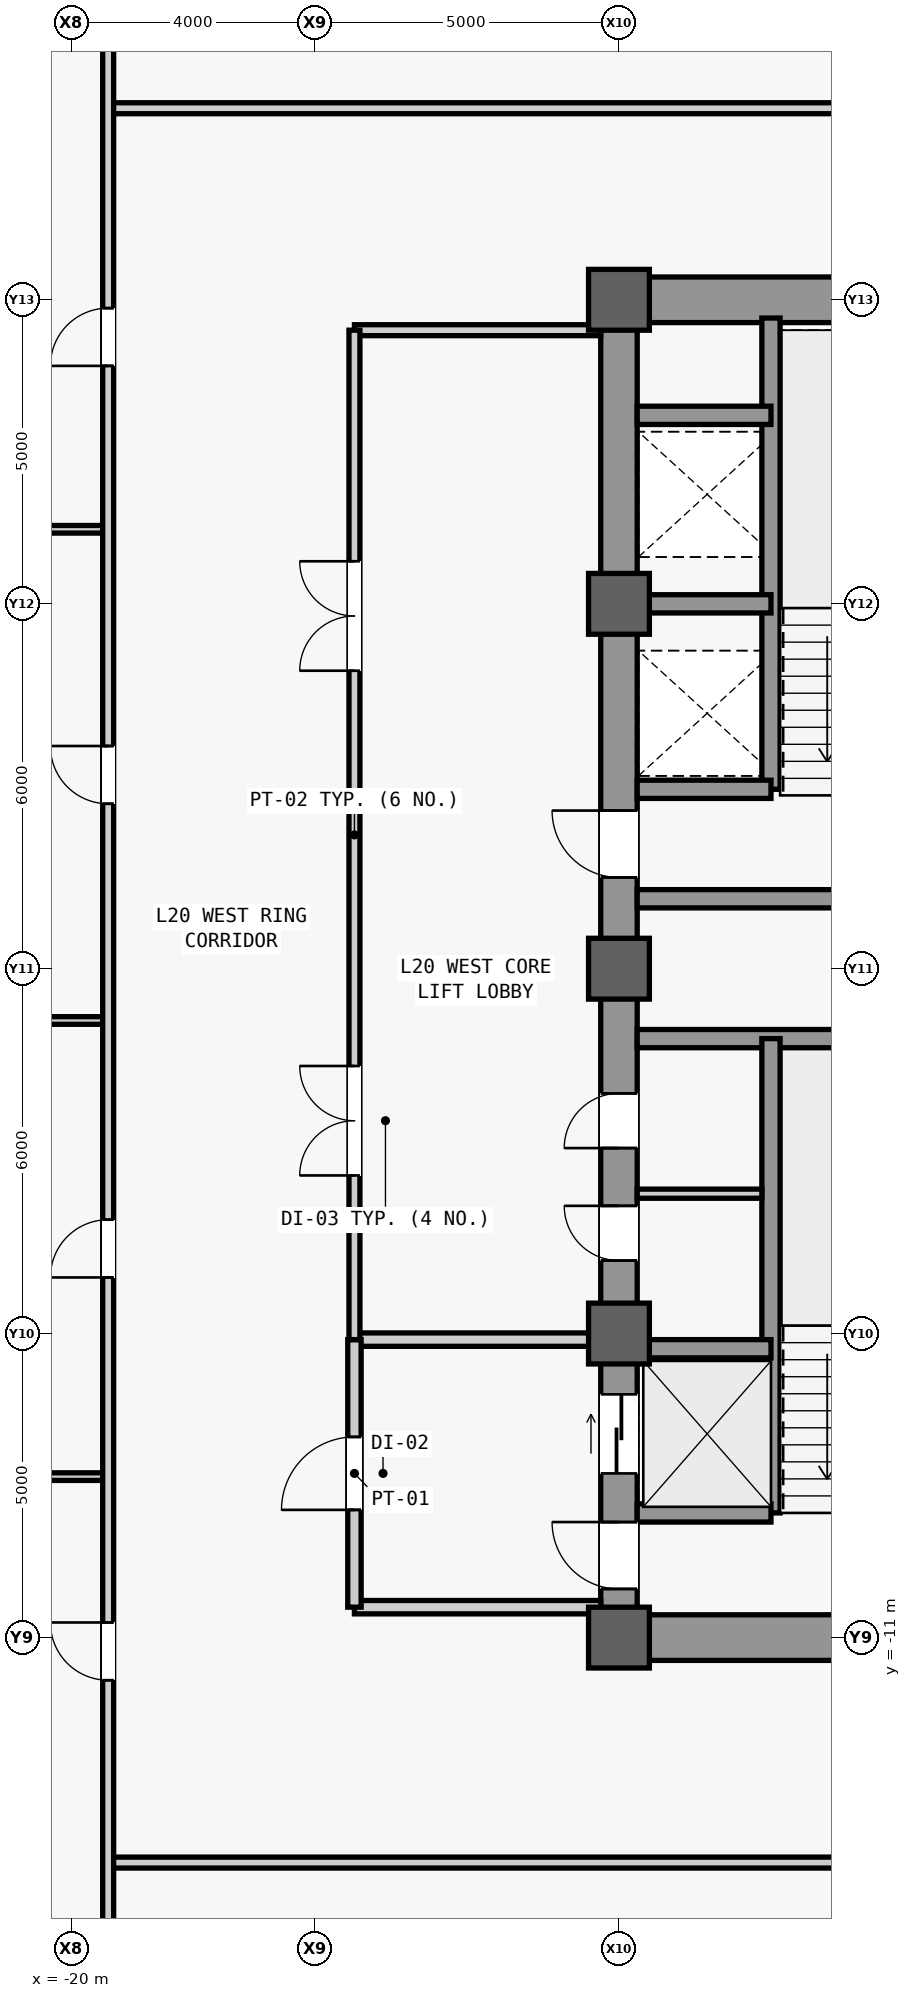
"""IFC4 building model, lengths in metres.
Left out: names, types, materials, properties, quantities, classifications, styles, units other than length and angle.
Written with IfcOpenShell. Run it as: python <this file> out.ifc"""

import sys

from ifc_helpers import new_model, si_unit, direction, frame, frame_2d, origin, origin_2d, place, context, subcontext, project, spatial, rectangle, extrude, source, transform, mapped, element, fill, save


model = new_model("IFC4")
c1 = context("Model", 3, precision=1e-05, world=origin(), true_north=direction((0.0, 1.0)))
c2 = subcontext(c1, "Body", "Model", "MODEL_VIEW")
j1 = project(units=[si_unit("LENGTHUNIT", "METRE"), si_unit("PLANEANGLEUNIT", "RADIAN")], contexts=[c1])
p1 = place(None, origin())
s1 = spatial("IfcSite", under=j1, at=p1, CompositionType="ELEMENT")
p2 = place(p1, origin())
s2 = spatial("IfcBuilding", under=s1, at=p2, CompositionType="ELEMENT")
p3 = place(p2, frame((0.0, 0.0, 91.4)))
s3 = spatial("IfcBuildingStorey", under=s2, at=p3, CompositionType="ELEMENT", Elevation=91.4)
m1 = source(origin(), c2, "Body", "SweptSolid", [
    extrude(rectangle(XDim=22.0, YDim=0.6, at=frame_2d((11.0, 0.0))), origin(), (0.0, 0.0, 1.0), 3.84),
])
p4 = place(p3, frame((-11.0, -11.0, 0.0), z_axis=(0.0, 0.0, 1.0), x_axis=(0.0, 1.0, 0.0)))
e1 = element("IfcWall", 1, at=p4, inside=s3, PredefinedType="SHEAR", context=c2, shape_type="MappedRepresentation", body=[
    mapped(m1, transform((0.0, 0.0, 0.0), scale=1.0)),
])
m2 = source(origin(), c2, "Body", "SweptSolid", [
    extrude(rectangle(XDim=1.1, YDim=2.2, at=frame_2d((0.55, 1.1))), frame((0.0, 0.31, 0.0), z_axis=(0.0, -1.0, 0.0), x_axis=(1.0, 0.0, 0.0)), (0.0, 0.0, 1.0), 0.62),
])
p5 = place(p4, frame((0.8, 0.0, 0.0)))
e2 = element("IfcOpeningElement", 2, at=p5, cuts=e1, PredefinedType="OPENING", context=c2, shape_type="MappedRepresentation", body=[
    mapped(m2, transform((0.0, 0.0, 0.0), scale=1.0)),
])
p6 = place(p4, frame((12.5, 0.0, 0.0)))
e3 = element("IfcOpeningElement", 3, at=p6, cuts=e1, PredefinedType="OPENING", context=c2, shape_type="MappedRepresentation", body=[
    mapped(m2, transform((0.0, 0.0, 0.0), scale=1.0)),
])
m3 = source(origin(), c2, "Body", "SweptSolid", [
    extrude(rectangle(XDim=0.9, YDim=2.15, at=frame_2d((0.45, 1.075))), frame((0.0, 0.31, 0.0), z_axis=(0.0, -1.0, 0.0), x_axis=(1.0, 0.0, 0.0)), (0.0, 0.0, 1.0), 0.62),
])
p7 = place(p4, frame((6.2, 0.0, 0.0)))
e4 = element("IfcOpeningElement", 4, at=p7, cuts=e1, PredefinedType="OPENING", context=c2, shape_type="MappedRepresentation", body=[
    mapped(m3, transform((0.0, 0.0, 0.0), scale=1.0)),
])
p8 = place(p4, frame((8.05, 0.0, 0.0)))
e5 = element("IfcOpeningElement", 5, at=p8, cuts=e1, PredefinedType="OPENING", context=c2, shape_type="MappedRepresentation", body=[
    mapped(m3, transform((0.0, 0.0, 0.0), scale=1.0)),
])
m4 = source(origin(), c2, "Body", "SweptSolid", [
    extrude(rectangle(XDim=1.3, YDim=2.3, at=frame_2d((0.65, 1.15))), frame((0.0, 0.31, 0.0), z_axis=(0.0, -1.0, 0.0), x_axis=(1.0, 0.0, 0.0)), (0.0, 0.0, 1.0), 0.62),
])
p9 = place(p4, frame((2.7, 0.0, 0.0)))
e6 = element("IfcOpeningElement", 6, at=p9, cuts=e1, PredefinedType="OPENING", context=c2, shape_type="MappedRepresentation", body=[
    mapped(m4, transform((0.0, 0.0, 0.0), scale=1.0)),
])
m5 = source(origin(), c2, "Body", "SweptSolid", [
    extrude(rectangle(XDim=5.85, YDim=0.75, at=frame_2d((2.925, 0.0))), origin(), (0.0, 0.0, 1.0), 3.84),
])
for number, where, z_axis, x_axis in (
    (7, (-10.7, -11.0, 0.0), (0.0, 0.0, 1.0), (1.0, 0.0, 0.0)),
    (8, (-10.7, 11.0, 0.0), (0.0, 0.0, 1.0), (1.0, 0.0, 0.0)),
):
    element("IfcWall", number, at=place(p3, frame(where, z_axis=z_axis, x_axis=x_axis)), inside=s3, PredefinedType="SHEAR", context=c2, shape_type="MappedRepresentation", body=[
        mapped(m5, transform((0.0, 0.0, 0.0), scale=1.0)),
    ])
m6 = source(origin(), c2, "Body", "SweptSolid", [
    extrude(rectangle(XDim=5.6, YDim=0.3, at=frame_2d((2.8, 0.0))), origin(), (0.0, 0.0, 1.0), 3.84),
])
for number, where, z_axis, x_axis in (
    (9, (-10.7, -1.15, 0.0), (0.0, 0.0, 1.0), (1.0, 0.0, 0.0)),
    (10, (-10.7, 1.15, 0.0), (0.0, 0.0, 1.0), (1.0, 0.0, 0.0)),
):
    element("IfcWall", number, at=place(p3, frame(where, z_axis=z_axis, x_axis=x_axis)), inside=s3, PredefinedType="SHEAR", context=c2, shape_type="MappedRepresentation", body=[
        mapped(m6, transform((0.0, 0.0, 0.0), scale=1.0)),
    ])
m7 = source(origin(), c2, "Body", "SweptSolid", [
    extrude(rectangle(XDim=1.0, YDim=1.0, at=origin_2d()), origin(), (0.0, 0.0, 1.0), 4.1),
])
for number, where, z_axis, x_axis in (
    (11, (-11.0, -11.0, 0.0), (0.0, 0.0, 1.0), (1.0, 0.0, 0.0)),
    (12, (-11.0, -6.0, 0.0), (0.0, 0.0, 1.0), (1.0, 0.0, 0.0)),
    (13, (-11.0, 0.0, 0.0), (0.0, 0.0, 1.0), (1.0, 0.0, 0.0)),
    (14, (-11.0, 6.0, 0.0), (0.0, 0.0, 1.0), (1.0, 0.0, 0.0)),
    (15, (-11.0, 11.0, 0.0), (0.0, 0.0, 1.0), (1.0, 0.0, 0.0)),
):
    element("IfcColumn", number, at=place(p3, frame(where, z_axis=z_axis, x_axis=x_axis)), inside=s3, PredefinedType="COLUMN", context=c2, shape_type="MappedRepresentation", body=[
        mapped(m7, transform((0.0, 0.0, 0.0), scale=1.0)),
    ])
m8 = source(origin(), c2, "Body", "SweptSolid", [
    extrude(rectangle(XDim=7.8, YDim=0.3, at=frame_2d((3.9, 0.0))), origin(), (0.0, 0.0, 1.0), 3.84),
])
p10 = place(p3, frame((-8.5, -8.95, 0.0), z_axis=(0.0, 0.0, 1.0), x_axis=(0.0, 1.0, 0.0)))
e16 = element("IfcWall", 16, at=p10, inside=s3, PredefinedType="SHEAR", context=c2, shape_type="MappedRepresentation", body=[
    mapped(m8, transform((0.0, 0.0, 0.0), scale=1.0)),
])
m9 = source(origin(), c2, "Body", "SweptSolid", [
    extrude(rectangle(XDim=2.2, YDim=0.3, at=frame_2d((1.1, 0.0))), origin(), (0.0, 0.0, 1.0), 3.84),
])
for number, where, z_axis, x_axis in (
    (17, (-10.7, -8.95, 0.0), (0.0, 0.0, 1.0), (1.0, 0.0, 0.0)),
    (18, (-10.7, -6.25, 0.0), (0.0, 0.0, 1.0), (1.0, 0.0, 0.0)),
):
    element("IfcWall", number, at=place(p3, frame(where, z_axis=z_axis, x_axis=x_axis)), inside=s3, PredefinedType="SHEAR", context=c2, shape_type="MappedRepresentation", body=[
        mapped(m9, transform((0.0, 0.0, 0.0), scale=1.0)),
    ])
m10 = source(origin(), c2, "Body", "SweptSolid", [
    extrude(rectangle(XDim=7.75, YDim=0.3, at=frame_2d((3.875, 0.0))), origin(), (0.0, 0.0, 1.0), 3.84),
])
p11 = place(p3, frame((-8.5, 2.95, 0.0), z_axis=(0.0, 0.0, 1.0), x_axis=(0.0, 1.0, 0.0)))
e19 = element("IfcWall", 19, at=p11, inside=s3, PredefinedType="SHEAR", context=c2, shape_type="MappedRepresentation", body=[
    mapped(m10, transform((0.0, 0.0, 0.0), scale=1.0)),
])
for number, where, z_axis, x_axis in (
    (20, (-10.7, 2.95, 0.0), (0.0, 0.0, 1.0), (1.0, 0.0, 0.0)),
    (21, (-10.7, 6.0, 0.0), (0.0, 0.0, 1.0), (1.0, 0.0, 0.0)),
    (22, (-10.7, 9.1, 0.0), (0.0, 0.0, 1.0), (1.0, 0.0, 0.0)),
):
    element("IfcWall", number, at=place(p3, frame(where, z_axis=z_axis, x_axis=x_axis)), inside=s3, PredefinedType="SHEAR", context=c2, shape_type="MappedRepresentation", body=[
        mapped(m9, transform((0.0, 0.0, 0.0), scale=1.0)),
    ])
m11 = source(origin(), c2, "Body", "SweptSolid", [
    extrude(rectangle(XDim=2.05, YDim=0.15, at=frame_2d((1.025, 0.0))), origin(), (0.0, 0.0, 1.0), 3.84),
])
p12 = place(p3, frame((-10.7, -3.7, 0.0), z_axis=(0.0, 0.0, 1.0), x_axis=(1.0, 0.0, 0.0)))
e23 = element("IfcWall", 23, at=p12, inside=s3, PredefinedType="PARTITIONING", context=c2, shape_type="MappedRepresentation", body=[
    mapped(m11, transform((0.0, 0.0, 0.0), scale=1.0)),
])
m12 = source(origin(), c2, "Body", "SweptSolid", [
    extrude(rectangle(XDim=4.05, YDim=0.22, at=frame_2d((2.025, 0.0))), origin(), (0.0, 0.0, 1.0), 3.84),
])
p13 = place(p3, frame((-15.35, -10.5, 0.0), z_axis=(0.0, 0.0, 1.0), x_axis=(1.0, 0.0, 0.0)))
e24 = element("IfcWall", 24, at=p13, inside=s3, PredefinedType="PARTITIONING", context=c2, shape_type="MappedRepresentation", body=[
    mapped(m12, transform((0.0, 0.0, 0.0), scale=1.0)),
])
m13 = source(origin(), c2, "Body", "SweptSolid", [
    extrude(rectangle(XDim=4.05, YDim=0.22, at=frame_2d((2.025, 0.0))), origin(), (0.0, 0.0, 1.0), 3.067),
])
p14 = place(p3, frame((-15.35, -6.1, 0.0), z_axis=(0.0, 0.0, 1.0), x_axis=(1.0, 0.0, 0.0)))
e25 = element("IfcWall", 25, at=p14, inside=s3, PredefinedType="PARTITIONING", context=c2, shape_type="MappedRepresentation", body=[
    mapped(m13, transform((0.0, 0.0, 0.0), scale=1.0)),
])
m14 = source(origin(), c2, "Body", "SweptSolid", [
    extrude(rectangle(XDim=4.4, YDim=0.22, at=frame_2d((2.2, 0.0))), origin(), (0.0, 0.0, 1.0), 3.84),
])
p15 = place(p3, frame((-15.35, -10.5, 0.0), z_axis=(0.0, 0.0, 1.0), x_axis=(0.0, 1.0, 0.0)))
e26 = element("IfcWall", 26, at=p15, inside=s3, PredefinedType="PARTITIONING", context=c2, shape_type="MappedRepresentation", body=[
    mapped(m14, transform((0.0, 0.0, 0.0), scale=1.0)),
])
m15 = source(origin(), c2, "Body", "SweptSolid", [
    extrude(rectangle(XDim=1.2, YDim=2.2, at=frame_2d((0.6, 1.1))), frame((0.0, 0.12, 0.0), z_axis=(0.0, -1.0, 0.0), x_axis=(1.0, 0.0, 0.0)), (0.0, 0.0, 1.0), 0.24),
])
p16 = place(p15, frame((1.6, 0.0, 0.0)))
e27 = element("IfcOpeningElement", 27, at=p16, cuts=e26, PredefinedType="OPENING", context=c2, shape_type="MappedRepresentation", body=[
    mapped(m15, transform((0.0, 0.0, 0.0), scale=1.0)),
])
m16 = source(origin(), c2, "Body", "SweptSolid", [
    extrude(rectangle(XDim=4.05, YDim=0.18, at=frame_2d((2.025, 0.0))), origin(), (0.0, 0.0, 1.0), 3.84),
])
p17 = place(p3, frame((-15.35, 10.5, 0.0), z_axis=(0.0, 0.0, 1.0), x_axis=(1.0, 0.0, 0.0)))
e28 = element("IfcWall", 28, at=p17, inside=s3, PredefinedType="PARTITIONING", context=c2, shape_type="MappedRepresentation", body=[
    mapped(m16, transform((0.0, 0.0, 0.0), scale=1.0)),
])
m17 = source(origin(), c2, "Body", "SweptSolid", [
    extrude(rectangle(XDim=16.6, YDim=0.18, at=frame_2d((8.3, 0.0))), origin(), (0.0, 0.0, 1.0), 3.84),
])
p18 = place(p3, frame((-15.35, -6.1, 0.0), z_axis=(0.0, 0.0, 1.0), x_axis=(0.0, 1.0, 0.0)))
e29 = element("IfcWall", 29, at=p18, inside=s3, PredefinedType="PARTITIONING", context=c2, shape_type="MappedRepresentation", body=[
    mapped(m17, transform((0.0, 0.0, 0.0), scale=1.0)),
])
m18 = source(origin(), c2, "Body", "SweptSolid", [
    extrude(rectangle(XDim=1.8, YDim=2.25, at=frame_2d((0.9, 1.125))), frame((0.0, 0.1, 0.0), z_axis=(0.0, -1.0, 0.0), x_axis=(1.0, 0.0, 0.0)), (0.0, 0.0, 1.0), 0.2),
])
p19 = place(p18, frame((2.7, 0.0, 0.0)))
e30 = element("IfcOpeningElement", 30, at=p19, cuts=e29, PredefinedType="OPENING", context=c2, shape_type="MappedRepresentation", body=[
    mapped(m18, transform((0.0, 0.0, 0.0), scale=1.0)),
])
p20 = place(p18, frame((11.0, 0.0, 0.0)))
e31 = element("IfcOpeningElement", 31, at=p20, cuts=e29, PredefinedType="OPENING", context=c2, shape_type="MappedRepresentation", body=[
    mapped(m18, transform((0.0, 0.0, 0.0), scale=1.0)),
])
m19 = source(origin(), c2, "Body", "SweptSolid", [
    extrude(rectangle(XDim=37.1, YDim=0.18, at=frame_2d((18.55, 0.0))), origin(), (0.0, 0.0, 1.0), 3.84),
])
p21 = place(p3, frame((-19.4, -14.7, 0.0), z_axis=(0.0, 0.0, 1.0), x_axis=(1.0, 0.0, 0.0)))
e32 = element("IfcWall", 32, at=p21, inside=s3, PredefinedType="PARTITIONING", context=c2, shape_type="MappedRepresentation", body=[
    mapped(m19, transform((0.0, 0.0, 0.0), scale=1.0)),
])
m20 = source(origin(), c2, "Body", "SweptSolid", [
    extrude(rectangle(XDim=1.05, YDim=2.2, at=frame_2d((0.525, 1.1))), frame((0.0, 0.1, 0.0), z_axis=(0.0, -1.0, 0.0), x_axis=(1.0, 0.0, 0.0)), (0.0, 0.0, 1.0), 0.2),
])
p22 = place(p21, frame((18.875, 0.0, 0.0)))
e33 = element("IfcOpeningElement", 33, at=p22, cuts=e32, PredefinedType="OPENING", context=c2, shape_type="MappedRepresentation", body=[
    mapped(m20, transform((0.0, 0.0, 0.0), scale=1.0)),
])
p23 = place(p3, frame((-19.4, 14.15, 0.0), z_axis=(0.0, 0.0, 1.0), x_axis=(1.0, 0.0, 0.0)))
e34 = element("IfcWall", 34, at=p23, inside=s3, PredefinedType="PARTITIONING", context=c2, shape_type="MappedRepresentation", body=[
    mapped(m19, transform((0.0, 0.0, 0.0), scale=1.0)),
])
p24 = place(p23, frame((18.875, 0.0, 0.0)))
e35 = element("IfcOpeningElement", 35, at=p24, cuts=e34, PredefinedType="OPENING", context=c2, shape_type="MappedRepresentation", body=[
    mapped(m20, transform((0.0, 0.0, 0.0), scale=1.0)),
])
m21 = source(origin(), c2, "Body", "SweptSolid", [
    extrude(rectangle(XDim=12.6, YDim=0.125, at=frame_2d((6.3, 0.0))), origin(), (0.0, 0.0, 1.0), 3.84),
])
for number, where, z_axis, x_axis in (
    (36, (-32.0, -8.353, 0.0), (0.0, 0.0, 1.0), (1.0, 0.0, 0.0)),
    (37, (-32.0, -0.852, 0.0), (0.0, 0.0, 1.0), (1.0, 0.0, 0.0)),
    (38, (-32.0, 7.226, 0.0), (0.0, 0.0, 1.0), (1.0, 0.0, 0.0)),
):
    element("IfcWall", number, at=place(p3, frame(where, z_axis=z_axis, x_axis=x_axis)), inside=s3, PredefinedType="PARTITIONING", context=c2, shape_type="MappedRepresentation", body=[
        mapped(m21, transform((0.0, 0.0, 0.0), scale=1.0)),
    ])
m22 = source(origin(), c2, "Body", "SweptSolid", [
    extrude(rectangle(XDim=56.0, YDim=0.18, at=frame_2d((28.0, 0.0))), origin(), (0.0, 0.0, 1.0), 3.371),
])
p25 = place(p3, frame((-19.4, -28.0, 0.0), z_axis=(0.0, 0.0, 1.0), x_axis=(0.0, 1.0, 0.0)))
e39 = element("IfcWall", 39, at=p25, inside=s3, PredefinedType="PARTITIONING", context=c2, shape_type="MappedRepresentation", body=[
    mapped(m22, transform((0.0, 0.0, 0.0), scale=1.0)),
])
m23 = source(origin(), c2, "Body", "SweptSolid", [
    extrude(rectangle(XDim=0.95, YDim=2.15, at=frame_2d((0.475, 1.075))), frame((0.0, 0.1, 0.0), z_axis=(0.0, -1.0, 0.0), x_axis=(1.0, 0.0, 0.0)), (0.0, 0.0, 1.0), 0.2),
])
p26 = place(p25, frame((16.299, 0.0, 0.0)))
e40 = element("IfcOpeningElement", 40, at=p26, cuts=e39, PredefinedType="OPENING", context=c2, shape_type="MappedRepresentation", body=[
    mapped(m23, transform((0.0, 0.0, 0.0), scale=1.0)),
])
p27 = place(p25, frame((22.923, 0.0, 0.0)))
e41 = element("IfcOpeningElement", 41, at=p27, cuts=e39, PredefinedType="OPENING", context=c2, shape_type="MappedRepresentation", body=[
    mapped(m23, transform((0.0, 0.0, 0.0), scale=1.0)),
])
p28 = place(p25, frame((30.712, 0.0, 0.0)))
e42 = element("IfcOpeningElement", 42, at=p28, cuts=e39, PredefinedType="OPENING", context=c2, shape_type="MappedRepresentation", body=[
    mapped(m23, transform((0.0, 0.0, 0.0), scale=1.0)),
])
p29 = place(p25, frame((37.913, 0.0, 0.0)))
e43 = element("IfcOpeningElement", 43, at=p29, cuts=e39, PredefinedType="OPENING", context=c2, shape_type="MappedRepresentation", body=[
    mapped(m23, transform((0.0, 0.0, 0.0), scale=1.0)),
])
m24 = source(origin(), c2, "Body", "SweptSolid", [
    extrude(rectangle(XDim=1.1, YDim=2.2, at=frame_2d((0.55, 1.1))), frame((0.0, 0.025, 0.0), z_axis=(0.0, -1.0, 0.0), x_axis=(1.0, 0.0, 0.0)), (0.0, 0.0, 1.0), 0.05),
])
p30 = place(p5, origin())
e44 = element("IfcDoor", 44, at=p30, inside=s3, OperationType="SINGLE_SWING_RIGHT", PredefinedType="DOOR", context=c2, shape_type="MappedRepresentation", body=[
    mapped(m24, transform((0.0, 0.0, 0.0), scale=1.0)),
])
fill(e2, e44)
p31 = place(p6, origin())
e45 = element("IfcDoor", 45, at=p31, inside=s3, OperationType="SINGLE_SWING_RIGHT", PredefinedType="DOOR", context=c2, shape_type="MappedRepresentation", body=[
    mapped(m24, transform((0.0, 0.0, 0.0), scale=1.0)),
])
fill(e3, e45)
m25 = source(origin(), c2, "Body", "SweptSolid", [
    extrude(rectangle(XDim=0.9, YDim=2.15, at=frame_2d((0.45, 1.075))), frame((0.0, 0.025, 0.0), z_axis=(0.0, -1.0, 0.0), x_axis=(1.0, 0.0, 0.0)), (0.0, 0.0, 1.0), 0.05),
])
p32 = place(p7, origin())
e46 = element("IfcDoor", 46, at=p32, inside=s3, OperationType="SINGLE_SWING_RIGHT", PredefinedType="DOOR", context=c2, shape_type="MappedRepresentation", body=[
    mapped(m25, transform((0.0, 0.0, 0.0), scale=1.0)),
])
fill(e4, e46)
p33 = place(p8, origin())
e47 = element("IfcDoor", 47, at=p33, inside=s3, OperationType="SINGLE_SWING_LEFT", PredefinedType="DOOR", context=c2, shape_type="MappedRepresentation", body=[
    mapped(m25, transform((0.0, 0.0, 0.0), scale=1.0)),
])
fill(e5, e47)
m26 = source(origin(), c2, "Body", "SweptSolid", [
    extrude(rectangle(XDim=1.2, YDim=2.2, at=frame_2d((0.6, 1.1))), frame((0.0, 0.025, 0.0), z_axis=(0.0, -1.0, 0.0), x_axis=(1.0, 0.0, 0.0)), (0.0, 0.0, 1.0), 0.05),
])
p34 = place(p16, origin())
e48 = element("IfcDoor", 48, at=p34, inside=s3, OperationType="SINGLE_SWING_LEFT", PredefinedType="DOOR", context=c2, shape_type="MappedRepresentation", body=[
    mapped(m26, transform((0.0, 0.0, 0.0), scale=1.0)),
])
fill(e27, e48)
m27 = source(origin(), c2, "Body", "SweptSolid", [
    extrude(rectangle(XDim=1.8, YDim=2.25, at=frame_2d((0.9, 1.125))), frame((0.0, 0.025, 0.0), z_axis=(0.0, -1.0, 0.0), x_axis=(1.0, 0.0, 0.0)), (0.0, 0.0, 1.0), 0.05),
])
p35 = place(p19, origin())
e49 = element("IfcDoor", 49, at=p35, inside=s3, OperationType="SINGLE_SWING_LEFT", PredefinedType="DOOR", context=c2, shape_type="MappedRepresentation", body=[
    mapped(m27, transform((0.0, 0.0, 0.0), scale=1.0)),
])
fill(e30, e49)
p36 = place(p20, origin())
e50 = element("IfcDoor", 50, at=p36, inside=s3, OperationType="SINGLE_SWING_RIGHT", PredefinedType="DOOR", context=c2, shape_type="MappedRepresentation", body=[
    mapped(m27, transform((0.0, 0.0, 0.0), scale=1.0)),
])
fill(e31, e50)
m28 = source(origin(), c2, "Body", "SweptSolid", [
    extrude(rectangle(XDim=0.95, YDim=2.15, at=frame_2d((0.475, 1.075))), frame((0.0, 0.025, 0.0), z_axis=(0.0, -1.0, 0.0), x_axis=(1.0, 0.0, 0.0)), (0.0, 0.0, 1.0), 0.05),
])
p37 = place(p26, origin())
e51 = element("IfcDoor", 51, at=p37, inside=s3, OperationType="SINGLE_SWING_RIGHT", PredefinedType="DOOR", context=c2, shape_type="MappedRepresentation", body=[
    mapped(m28, transform((0.0, 0.0, 0.0), scale=1.0)),
])
fill(e40, e51)
p38 = place(p27, origin())
e52 = element("IfcDoor", 52, at=p38, inside=s3, OperationType="SINGLE_SWING_LEFT", PredefinedType="DOOR", context=c2, shape_type="MappedRepresentation", body=[
    mapped(m28, transform((0.0, 0.0, 0.0), scale=1.0)),
])
fill(e41, e52)
p39 = place(p28, origin())
e53 = element("IfcDoor", 53, at=p39, inside=s3, OperationType="SINGLE_SWING_RIGHT", PredefinedType="DOOR", context=c2, shape_type="MappedRepresentation", body=[
    mapped(m28, transform((0.0, 0.0, 0.0), scale=1.0)),
])
fill(e42, e53)
p40 = place(p29, origin())
e54 = element("IfcDoor", 54, at=p40, inside=s3, OperationType="SINGLE_SWING_LEFT", PredefinedType="DOOR", context=c2, shape_type="MappedRepresentation", body=[
    mapped(m28, transform((0.0, 0.0, 0.0), scale=1.0)),
])
fill(e43, e54)
m29 = source(origin(), c2, "Body", "SweptSolid", [
    extrude(rectangle(XDim=1.3, YDim=2.3, at=frame_2d((0.65, 1.15))), frame((0.0, 0.025, 0.0), z_axis=(0.0, -1.0, 0.0), x_axis=(1.0, 0.0, 0.0)), (0.0, 0.0, 1.0), 0.05),
])
p41 = place(p9, origin())
e55 = element("IfcDoor", 55, at=p41, inside=s3, OperationType="SLIDING_TO_LEFT", PredefinedType="DOOR", context=c2, shape_type="MappedRepresentation", body=[
    mapped(m29, transform((0.0, 0.0, 0.0), scale=1.0)),
])
fill(e6, e55)
save(model, sys.argv[1])
